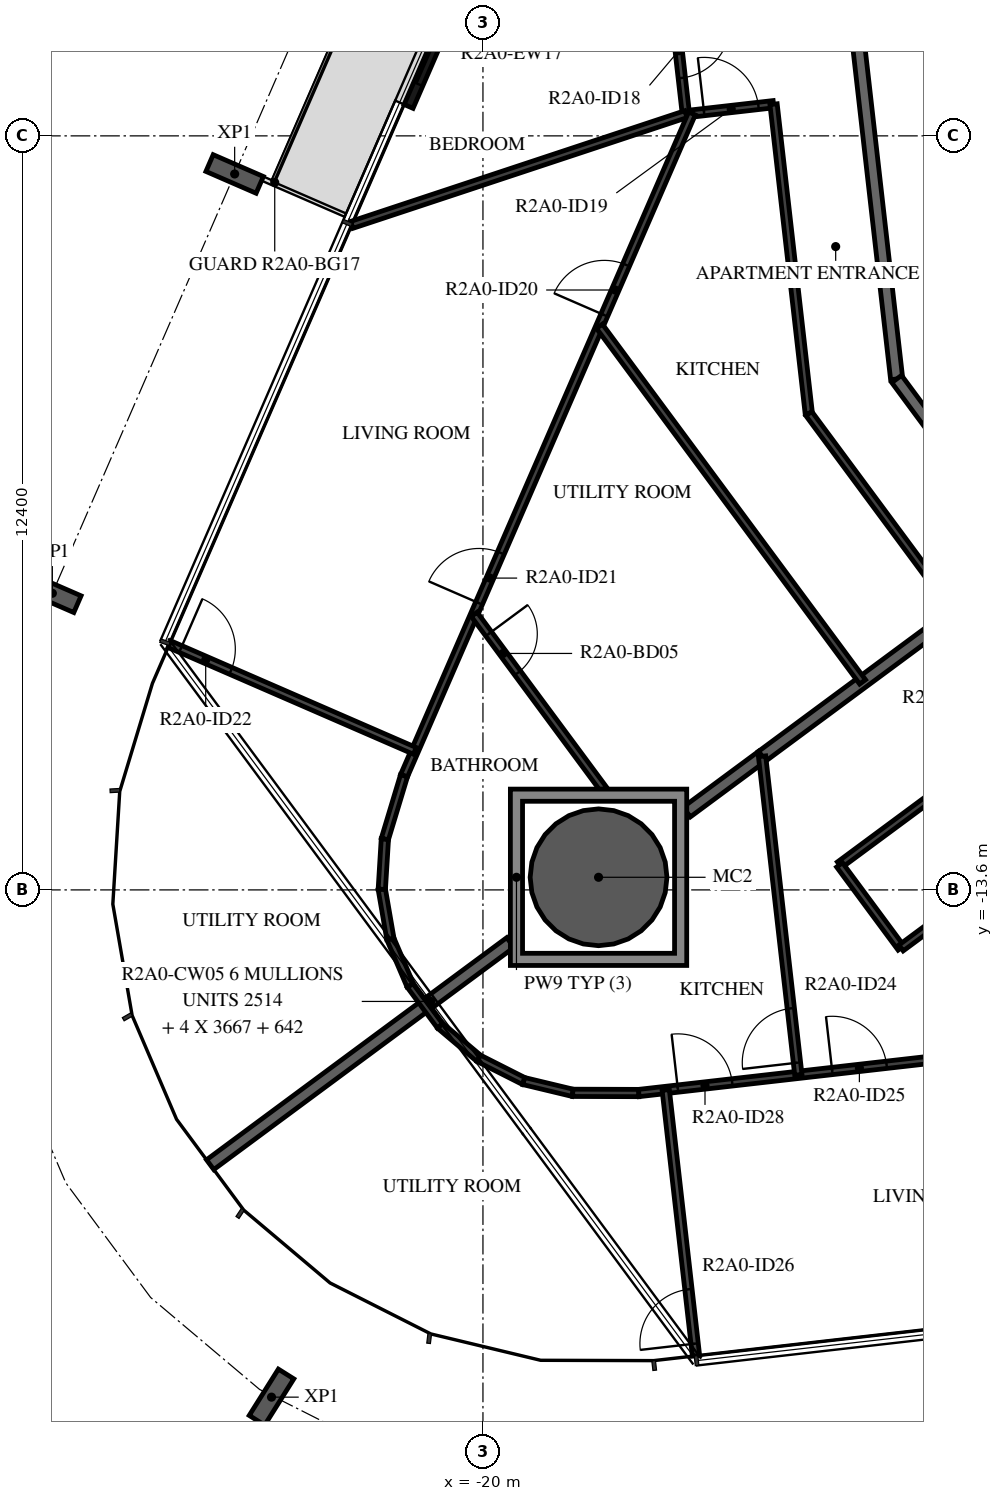
"""IFC4 building model, lengths in metres.
Left out: names, types, materials, properties, quantities, classifications, styles, units other than length and angle.
Written with IfcOpenShell. Run it as: python <this file> out.ifc"""

import sys

from ifc_helpers import new_model, si_unit, direction, frame, frame_2d, origin, origin_2d, place, context, subcontext, project, spatial, polyline, rectangle, hollow_circle, i_section, outline, extrude, element, fill, save


model = new_model("IFC4")
c1 = context("Model", 3, precision=1e-05, world=origin(), true_north=direction((0.0, 1.0)))
c2 = subcontext(c1, "Body", "Model", "MODEL_VIEW")
j1 = project(units=[si_unit("LENGTHUNIT", "METRE"), si_unit("PLANEANGLEUNIT", "RADIAN")], contexts=[c1])
p1 = place(None, origin())
s1 = spatial("IfcSite", under=j1, at=p1, CompositionType="ELEMENT")
p2 = place(p1, origin())
s2 = spatial("IfcBuilding", under=s1, at=p2, CompositionType="ELEMENT")
p3 = place(p2, frame((0.0, 0.0, 83.7)))
s3 = spatial("IfcBuildingStorey", under=s2, at=p3, CompositionType="ELEMENT", Elevation=83.7)
p4 = place(p3, frame((-18.099, -13.393, -0.38), z_axis=(0.0, 0.0, 1.0), x_axis=(1.0, 0.0, 0.0)))
e1 = element("IfcColumn", 1, at=p4, inside=s3, PredefinedType="COLUMN", context=c2, shape_type="SweptSolid", body=[
    extrude(hollow_circle(Radius=1.125, WallThickness=0.055, at=origin_2d()), origin(), (0.0, 0.0, 1.0), 3.5),
])
for number, where, z_axis, x_axis in (
    (2, (-24.083, -1.826, -0.38), (0.0, 0.0, 1.0), (0.399, 0.917, 0.0)),
    (3, (-27.081, -8.722, -0.38), (0.0, 0.0, 1.0), (0.399, 0.917, 0.0)),
    (4, (-23.477, -21.941, -0.38), (0.0, 0.0, 1.0), (-0.846, 0.532, 0.0)),
):
    element("IfcColumn", number, at=place(p3, frame(where, z_axis=z_axis, x_axis=x_axis)), inside=s3, PredefinedType="COLUMN", context=c2, shape_type="SweptSolid", body=[
        extrude(i_section(OverallWidth=0.3, OverallDepth=0.9, WebThickness=0.019, FlangeThickness=0.035, FilletRadius=0.03, at=origin_2d()), origin(), (0.0, 0.0, 1.0), 3.5),
    ])
p5 = place(p3, frame((-19.947, 2.219, 0.0), z_axis=(0.0, 0.0, 1.0), x_axis=(-0.398784695066, -0.917044582876, 0.0)))
e5 = element("IfcWall", 5, at=p5, inside=s3, PredefinedType="STANDARD", context=c2, shape_type="SweptSolid", body=[
    extrude(rectangle(XDim=3.2, YDim=0.16, at=frame_2d((1.6, 0.0))), origin(), (0.0, 0.0, 1.0), 3.12),
])
p6 = place(p5, frame((0.4, 0.0, 0.0)))
e6 = element("IfcOpeningElement", 6, at=p6, cuts=e5, PredefinedType="OPENING", context=c2, shape_type="SweptSolid", body=[
    extrude(rectangle(XDim=2.4, YDim=2.4, at=frame_2d((1.2, 1.2))), frame((0.0, 0.09, 0.0), z_axis=(0.0, -1.0, 0.0), x_axis=(1.0, 0.0, 0.0)), (0.0, 0.0, 1.0), 0.18),
])
p7 = place(p3, frame((-14.013, 1.974, 0.0), z_axis=(0.0, 0.0, 1.0), x_axis=(0.113196526349, -0.993572617589, 0.0)))
e7 = element("IfcWall", 7, at=p7, inside=s3, PredefinedType="STANDARD", context=c2, shape_type="SweptSolid", body=[
    extrude(rectangle(XDim=7.219, YDim=0.2, at=frame_2d((3.609, 0.0))), origin(), (0.0, 0.0, 1.0), 3.12),
])
p8 = place(p7, frame((0.2, 0.0, 0.0)))
e8 = element("IfcOpeningElement", 8, at=p8, cuts=e7, PredefinedType="OPENING", context=c2, shape_type="SweptSolid", body=[
    extrude(rectangle(XDim=1.0, YDim=2.1, at=frame_2d((0.5, 1.05))), frame((0.0, 0.11, 0.0), z_axis=(0.0, -1.0, 0.0), x_axis=(1.0, 0.0, 0.0)), (0.0, 0.0, 1.0), 0.22),
])
p9 = place(p3, frame((-13.196, -5.198, 0.0), z_axis=(0.0, 0.0, 1.0), x_axis=(0.594805187394, -0.803869883159, 0.0)))
e9 = element("IfcWall", 9, at=p9, inside=s3, PredefinedType="STANDARD", context=c2, shape_type="SweptSolid", body=[
    extrude(rectangle(XDim=7.342, YDim=0.2, at=frame_2d((3.671, 0.0))), origin(), (0.0, 0.0, 1.0), 3.12),
])
p10 = place(p3, frame((-15.41, -11.403, 0.0), z_axis=(0.0, 0.0, 1.0), x_axis=(0.803887568227, 0.594781285558, 0.0)))
e10 = element("IfcWall", 10, at=p10, inside=s3, PredefinedType="STANDARD", context=c2, shape_type="SweptSolid", body=[
    extrude(rectangle(XDim=5.47, YDim=0.2, at=frame_2d((2.735, 0.0))), origin(), (0.0, 0.0, 1.0), 3.12),
])
p11 = place(p3, frame((-16.649, -12.32, 0.0), z_axis=(0.0, 0.0, 1.0), x_axis=(0.803804030903, 0.594894175383, 0.0)))
e11 = element("IfcWall", 11, at=p11, inside=s3, PredefinedType="STANDARD", context=c2, shape_type="SweptSolid", body=[
    extrude(rectangle(XDim=1.542, YDim=0.2, at=frame_2d((0.771, 0.0))), origin(), (0.0, 0.0, 1.0), 3.12),
])
p12 = place(p3, frame((-24.486, -18.119, 0.0), z_axis=(0.0, 0.0, 1.0), x_axis=(0.80384227933, 0.594842491726, 0.0)))
e12 = element("IfcWall", 12, at=p12, inside=s3, PredefinedType="STANDARD", context=c2, shape_type="SweptSolid", body=[
    extrude(rectangle(XDim=6.142, YDim=0.2, at=frame_2d((3.071, 0.0))), origin(), (0.0, 0.0, 1.0), 3.12),
])
p13 = place(p3, frame((-16.854, 0.846, 0.0), z_axis=(0.0, 0.0, 1.0), x_axis=(0.113173930474, -0.993575191649, 0.0)))
e13 = element("IfcWall", 13, at=p13, inside=s3, PredefinedType="PARTITIONING", context=c2, shape_type="SweptSolid", body=[
    extrude(rectangle(XDim=1.7, YDim=0.12, at=frame_2d((0.85, 0.0))), origin(), (0.0, 0.0, 1.0), 3.12),
])
p14 = place(p13, frame((0.2, 0.0, 0.0)))
e14 = element("IfcOpeningElement", 14, at=p14, cuts=e13, PredefinedType="OPENING", context=c2, shape_type="SweptSolid", body=[
    extrude(rectangle(XDim=0.9, YDim=2.1, at=frame_2d((0.45, 1.05))), frame((0.0, 0.07, 0.0), z_axis=(0.0, -1.0, 0.0), x_axis=(1.0, 0.0, 0.0)), (0.0, 0.0, 1.0), 0.14),
])
p15 = place(p3, frame((-16.563, -0.832, 0.0), z_axis=(0.0, 0.0, 1.0), x_axis=(0.993578035261, 0.113148963084, 0.0)))
e15 = element("IfcWall", 15, at=p15, inside=s3, PredefinedType="PARTITIONING", context=c2, shape_type="SweptSolid", body=[
    extrude(rectangle(XDim=1.351, YDim=0.12, at=frame_2d((0.675, 0.0))), origin(), (0.0, 0.0, 1.0), 3.12),
])
p16 = place(p15, frame((0.2, 0.0, 0.0)))
e16 = element("IfcOpeningElement", 16, at=p16, cuts=e15, PredefinedType="OPENING", context=c2, shape_type="SweptSolid", body=[
    extrude(rectangle(XDim=0.9, YDim=2.1, at=frame_2d((0.45, 1.05))), frame((0.0, 0.07, 0.0), z_axis=(0.0, -1.0, 0.0), x_axis=(1.0, 0.0, 0.0)), (0.0, 0.0, 1.0), 0.14),
])
p17 = place(p3, frame((-15.221, -0.679, 0.0), z_axis=(0.0, 0.0, 1.0), x_axis=(0.113219875647, -0.993569957154, 0.0)))
e17 = element("IfcWall", 17, at=p17, inside=s3, PredefinedType="PARTITIONING", context=c2, shape_type="SweptSolid", body=[
    extrude(rectangle(XDim=5.121, YDim=0.12, at=frame_2d((2.561, 0.0))), origin(), (0.0, 0.0, 1.0), 3.12),
])
p18 = place(p3, frame((-14.641, -5.767, 0.0), z_axis=(0.0, 0.0, 1.0), x_axis=(0.594825885962, -0.803854567313, 0.0)))
e18 = element("IfcWall", 18, at=p18, inside=s3, PredefinedType="PARTITIONING", context=c2, shape_type="SweptSolid", body=[
    extrude(rectangle(XDim=6.266, YDim=0.12, at=frame_2d((3.133, 0.0))), origin(), (0.0, 0.0, 1.0), 3.12),
])
p19 = place(p18, frame((4.273, 0.0, 0.0)))
e19 = element("IfcOpeningElement", 19, at=p19, cuts=e18, PredefinedType="OPENING", context=c2, shape_type="SweptSolid", body=[
    extrude(rectangle(XDim=0.9, YDim=2.1, at=frame_2d((0.45, 1.05))), frame((0.0, 0.07, 0.0), z_axis=(0.0, -1.0, 0.0), x_axis=(1.0, 0.0, 0.0)), (0.0, 0.0, 1.0), 0.14),
])
p20 = place(p3, frame((-22.157, -2.664, 0.0), z_axis=(0.0, 0.0, 1.0), x_axis=(0.949263673698, 0.314481283698, 0.0)))
e20 = element("IfcWall", 20, at=p20, inside=s3, PredefinedType="PARTITIONING", context=c2, shape_type="SweptSolid", body=[
    extrude(rectangle(XDim=5.789, YDim=0.12, at=frame_2d((2.895, 0.0))), origin(), (0.0, 0.0, 1.0), 3.12),
])
p21 = place(p3, frame((-21.298, -11.722, 0.0), z_axis=(0.0, 0.0, 1.0), x_axis=(0.398737387658, 0.917065153456, 0.0)))
e21 = element("IfcWall", 21, at=p21, inside=s3, PredefinedType="PARTITIONING", context=c2, shape_type="SweptSolid", body=[
    extrude(rectangle(XDim=11.875, YDim=0.12, at=frame_2d((5.938, 0.0))), origin(), (0.0, 0.0, 1.0), 3.12),
])
p22 = place(p21, frame((8.26, 0.0, 0.0)))
e22 = element("IfcOpeningElement", 22, at=p22, cuts=e21, PredefinedType="OPENING", context=c2, shape_type="SweptSolid", body=[
    extrude(rectangle(XDim=0.9, YDim=2.1, at=frame_2d((0.45, 1.05))), frame((0.0, 0.07, 0.0), z_axis=(0.0, -1.0, 0.0), x_axis=(1.0, 0.0, 0.0)), (0.0, 0.0, 1.0), 0.14),
])
p23 = place(p21, frame((3.094, 0.0, 0.0)))
e23 = element("IfcOpeningElement", 23, at=p23, cuts=e21, PredefinedType="OPENING", context=c2, shape_type="SweptSolid", body=[
    extrude(rectangle(XDim=0.9, YDim=2.1, at=frame_2d((0.45, 1.05))), frame((0.0, 0.07, 0.0), z_axis=(0.0, -1.0, 0.0), x_axis=(1.0, 0.0, 0.0)), (0.0, 0.0, 1.0), 0.14),
])
p24 = place(p3, frame((-25.156, -9.559, 0.0), z_axis=(0.0, 0.0, 1.0), x_axis=(0.917042707292, -0.398789008127, 0.0)))
e24 = element("IfcWall", 24, at=p24, inside=s3, PredefinedType="PARTITIONING", context=c2, shape_type="SweptSolid", body=[
    extrude(rectangle(XDim=4.4, YDim=0.12, at=frame_2d((2.2, 0.0))), origin(), (0.0, 0.0, 1.0), 2.73),
])
p25 = place(p24, frame((0.2, 0.0, 0.0)))
e25 = element("IfcOpeningElement", 25, at=p25, cuts=e24, PredefinedType="OPENING", context=c2, shape_type="SweptSolid", body=[
    extrude(rectangle(XDim=0.9, YDim=2.1, at=frame_2d((0.45, 1.05))), frame((0.0, 0.07, 0.0), z_axis=(0.0, -1.0, 0.0), x_axis=(1.0, 0.0, 0.0)), (0.0, 0.0, 1.0), 0.14),
])
p26 = place(p3, frame((-18.084, -4.331, 0.0), z_axis=(0.0, 0.0, 1.0), x_axis=(0.594811782108, -0.803865003508, 0.0)))
e26 = element("IfcWall", 26, at=p26, inside=s3, PredefinedType="PARTITIONING", context=c2, shape_type="SweptSolid", body=[
    extrude(rectangle(XDim=7.276, YDim=0.12, at=frame_2d((3.638, 0.0))), origin(), (0.0, 0.0, 1.0), 3.12),
])
p27 = place(p3, frame((-20.144, -9.068, 0.0), z_axis=(0.0, 0.0, 1.0), x_axis=(0.59487477233, -0.803818390711, 0.0)))
e27 = element("IfcWall", 27, at=p27, inside=s3, PredefinedType="PARTITIONING", context=c2, shape_type="SweptSolid", body=[
    extrude(rectangle(XDim=3.575, YDim=0.12, at=frame_2d((1.788, 0.0))), origin(), (0.0, 0.0, 1.0), 3.12),
])
p28 = place(p27, frame((0.4, 0.0, 0.0)))
e28 = element("IfcOpeningElement", 28, at=p28, cuts=e27, PredefinedType="OPENING", context=c2, shape_type="SweptSolid", body=[
    extrude(rectangle(XDim=0.8, YDim=2.1, at=frame_2d((0.4, 1.05))), frame((0.0, 0.07, 0.0), z_axis=(0.0, -1.0, 0.0), x_axis=(1.0, 0.0, 0.0)), (0.0, 0.0, 1.0), 0.14),
])
for number, where, z_axis, x_axis in (
    (29, (-20.703, -15.835, 0.0), (0.0, 0.0, 1.0), (-0.595, 0.804, 0.0)),
    (30, (-21.196, -15.168, 0.0), (0.0, 0.0, 1.0), (-0.394, 0.919, 0.0)),
):
    element("IfcWall", number, at=place(p3, frame(where, z_axis=z_axis, x_axis=x_axis)), inside=s3, PredefinedType="PARTITIONING", context=c2, shape_type="SweptSolid", body=[
        extrude(rectangle(XDim=0.829, YDim=0.12, at=frame_2d((0.415, 0.0))), origin(), (0.0, 0.0, 1.0), 3.12),
    ])
p29 = place(p3, frame((-21.522, -14.406, 0.0), z_axis=(0.0, 0.0, 1.0), x_axis=(-0.170794347099, 0.985306698952, 0.0)))
e31 = element("IfcWall", 31, at=p29, inside=s3, PredefinedType="PARTITIONING", context=c2, shape_type="SweptSolid", body=[
    extrude(rectangle(XDim=0.829, YDim=0.12, at=frame_2d((0.415, 0.0))), origin(), (0.0, 0.0, 1.0), 3.12),
])
p30 = place(p3, frame((-21.664, -13.59, 0.0), z_axis=(0.0, 0.0, 1.0), x_axis=(0.061277779288, 0.998120751095, 0.0)))
e32 = element("IfcWall", 32, at=p30, inside=s3, PredefinedType="PARTITIONING", context=c2, shape_type="SweptSolid", body=[
    extrude(rectangle(XDim=0.829, YDim=0.12, at=frame_2d((0.414, 0.0))), origin(), (0.0, 0.0, 1.0), 3.12),
])
p31 = place(p3, frame((-21.613, -12.762, 0.0), z_axis=(0.0, 0.0, 1.0), x_axis=(0.289552239308, 0.95716221233, 0.0)))
e33 = element("IfcWall", 33, at=p31, inside=s3, PredefinedType="PARTITIONING", context=c2, shape_type="SweptSolid", body=[
    extrude(rectangle(XDim=1.087, YDim=0.12, at=frame_2d((0.543, 0.0))), origin(), (0.0, 0.0, 1.0), 3.12),
])
p32 = place(p3, frame((-10.914, -10.804, 0.0), z_axis=(0.0, 0.0, 1.0), x_axis=(-0.803864616889, -0.594812304609, 0.0)))
e34 = element("IfcWall", 34, at=p32, inside=s3, PredefinedType="PARTITIONING", context=c2, shape_type="SweptSolid", body=[
    extrude(rectangle(XDim=4.008, YDim=0.12, at=frame_2d((2.004, 0.0))), origin(), (0.0, 0.0, 1.0), 3.12),
])
p33 = place(p3, frame((-14.136, -13.188, 0.0), z_axis=(0.0, 0.0, 1.0), x_axis=(0.594863421241, -0.803826791087, 0.0)))
e35 = element("IfcWall", 35, at=p33, inside=s3, PredefinedType="PARTITIONING", context=c2, shape_type="SweptSolid", body=[
    extrude(rectangle(XDim=1.7, YDim=0.12, at=frame_2d((0.85, 0.0))), origin(), (0.0, 0.0, 1.0), 3.12),
])
p34 = place(p3, frame((-13.125, -14.555, 0.0), z_axis=(0.0, 0.0, 1.0), x_axis=(0.80389374229, 0.594772940799, 0.0)))
e36 = element("IfcWall", 36, at=p34, inside=s3, PredefinedType="PARTITIONING", context=c2, shape_type="SweptSolid", body=[
    extrude(rectangle(XDim=4.008, YDim=0.12, at=frame_2d((2.004, 0.0))), origin(), (0.0, 0.0, 1.0), 3.12),
])
for number, where, z_axis, x_axis in (
    (37, (-20.703, -15.835, 0.0), (0.0, 0.0, 1.0), (0.764, -0.645, 0.0)),
    (38, (-20.069, -16.369, 0.0), (0.0, 0.0, 1.0), (0.892, -0.451, 0.0)),
):
    element("IfcWall", number, at=place(p3, frame(where, z_axis=z_axis, x_axis=x_axis)), inside=s3, PredefinedType="PARTITIONING", context=c2, shape_type="SweptSolid", body=[
        extrude(rectangle(XDim=0.829, YDim=0.12, at=frame_2d((0.415, 0.0))), origin(), (0.0, 0.0, 1.0), 3.12),
    ])
p35 = place(p3, frame((-19.33, -16.744, 0.0), z_axis=(0.0, 0.0, 1.0), x_axis=(0.972403343288, -0.23330610357, 0.0)))
e39 = element("IfcWall", 39, at=p35, inside=s3, PredefinedType="PARTITIONING", context=c2, shape_type="SweptSolid", body=[
    extrude(rectangle(XDim=0.829, YDim=0.12, at=frame_2d((0.415, 0.0))), origin(), (0.0, 0.0, 1.0), 3.12),
])
p36 = place(p3, frame((-18.524, -16.937, 0.0), z_axis=(0.0, 0.0, 1.0), x_axis=(0.999995736722, -0.00292002349, 0.0)))
e40 = element("IfcWall", 40, at=p36, inside=s3, PredefinedType="PARTITIONING", context=c2, shape_type="SweptSolid", body=[
    extrude(rectangle(XDim=1.087, YDim=0.12, at=frame_2d((0.543, 0.0))), origin(), (0.0, 0.0, 1.0), 3.12),
])
p37 = place(p3, frame((-17.437, -16.94, 0.0), z_axis=(0.0, 0.0, 1.0), x_axis=(0.993573314119, 0.113190412448, 0.0)))
e41 = element("IfcWall", 41, at=p37, inside=s3, PredefinedType="PARTITIONING", context=c2, shape_type="SweptSolid", body=[
    extrude(rectangle(XDim=14.576, YDim=0.12, at=frame_2d((7.288, 0.0))), origin(), (0.0, 0.0, 1.0), 3.12),
])
p38 = place(p37, frame((3.201, 0.0, 0.0)))
e42 = element("IfcOpeningElement", 42, at=p38, cuts=e41, PredefinedType="OPENING", context=c2, shape_type="SweptSolid", body=[
    extrude(rectangle(XDim=0.9, YDim=2.1, at=frame_2d((0.45, 1.05))), frame((0.0, 0.07, 0.0), z_axis=(0.0, -1.0, 0.0), x_axis=(1.0, 0.0, 0.0)), (0.0, 0.0, 1.0), 0.14),
])
p39 = place(p37, frame((0.645, 0.0, 0.0)))
e43 = element("IfcOpeningElement", 43, at=p39, cuts=e41, PredefinedType="OPENING", context=c2, shape_type="SweptSolid", body=[
    extrude(rectangle(XDim=0.9, YDim=2.1, at=frame_2d((0.45, 1.05))), frame((0.0, 0.07, 0.0), z_axis=(0.0, -1.0, 0.0), x_axis=(1.0, 0.0, 0.0)), (0.0, 0.0, 1.0), 0.14),
])
p40 = place(p3, frame((-14.813, -16.641, 0.0), z_axis=(0.0, 0.0, 1.0), x_axis=(-0.113210971478, 0.993570971767, 0.0)))
e44 = element("IfcWall", 44, at=p40, inside=s3, PredefinedType="PARTITIONING", context=c2, shape_type="SweptSolid", body=[
    extrude(rectangle(XDim=5.273, YDim=0.12, at=frame_2d((2.636, 0.0))), origin(), (0.0, 0.0, 1.0), 3.12),
])
p41 = place(p40, frame((0.2, 0.0, 0.0)))
e45 = element("IfcOpeningElement", 45, at=p41, cuts=e44, PredefinedType="OPENING", context=c2, shape_type="SweptSolid", body=[
    extrude(rectangle(XDim=0.9, YDim=2.1, at=frame_2d((0.45, 1.05))), frame((0.0, 0.07, 0.0), z_axis=(0.0, -1.0, 0.0), x_axis=(1.0, 0.0, 0.0)), (0.0, 0.0, 1.0), 0.14),
])
p42 = place(p3, frame((-16.496, -21.262, 0.0), z_axis=(0.0, 0.0, 1.0), x_axis=(-0.1132445713, 0.993567142709, 0.0)))
e46 = element("IfcWall", 46, at=p42, inside=s3, PredefinedType="PARTITIONING", context=c2, shape_type="SweptSolid", body=[
    extrude(rectangle(XDim=4.4, YDim=0.12, at=frame_2d((2.2, 0.0))), origin(), (0.0, 0.0, 1.0), 2.73),
])
p43 = place(p42, frame((0.2, 0.0, 0.0)))
e47 = element("IfcOpeningElement", 47, at=p43, cuts=e46, PredefinedType="OPENING", context=c2, shape_type="SweptSolid", body=[
    extrude(rectangle(XDim=0.9, YDim=2.1, at=frame_2d((0.45, 1.05))), frame((0.0, 0.07, 0.0), z_axis=(0.0, -1.0, 0.0), x_axis=(1.0, 0.0, 0.0)), (0.0, 0.0, 1.0), 0.14),
])
p44 = place(p3, origin())
e48 = element("IfcWall", 48, at=p44, inside=s3, PredefinedType="STANDARD", context=c2, shape_type="SweptSolid", body=[
    extrude(outline(polyline([(-16.649, -11.942), (-16.649, -14.843), (-19.549, -14.843), (-19.549, -11.942), (-16.649, -11.942)]), holes=[polyline([(-19.349, -14.643), (-16.849, -14.643), (-16.849, -12.143), (-19.349, -12.143), (-19.349, -14.643)])]), origin(), (0.0, 0.0, 1.0), 3.12),
])
p45 = place(p6, origin())
e49 = element("IfcDoor", 49, at=p45, inside=s3, OperationType="DOUBLE_DOOR_SLIDING", PredefinedType="DOOR", context=c2, shape_type="SweptSolid", body=[
    extrude(rectangle(XDim=2.4, YDim=2.4, at=frame_2d((1.2, 1.2))), frame((0.0, 0.025, 0.0), z_axis=(0.0, -1.0, 0.0), x_axis=(1.0, 0.0, 0.0)), (0.0, 0.0, 1.0), 0.05),
])
fill(e6, e49)
p46 = place(p14, origin())
e50 = element("IfcDoor", 50, at=p46, inside=s3, OperationType="SINGLE_SWING_RIGHT", PredefinedType="DOOR", context=c2, shape_type="SweptSolid", body=[
    extrude(rectangle(XDim=0.9, YDim=2.1, at=frame_2d((0.45, 1.05))), frame((0.0, 0.025, 0.0), z_axis=(0.0, -1.0, 0.0), x_axis=(1.0, 0.0, 0.0)), (0.0, 0.0, 1.0), 0.05),
])
fill(e14, e50)
p47 = place(p16, origin())
e51 = element("IfcDoor", 51, at=p47, inside=s3, OperationType="SINGLE_SWING_LEFT", PredefinedType="DOOR", context=c2, shape_type="SweptSolid", body=[
    extrude(rectangle(XDim=0.9, YDim=2.1, at=frame_2d((0.45, 1.05))), frame((0.0, 0.025, 0.0), z_axis=(0.0, -1.0, 0.0), x_axis=(1.0, 0.0, 0.0)), (0.0, 0.0, 1.0), 0.05),
])
fill(e16, e51)
p48 = place(p22, origin())
e52 = element("IfcDoor", 52, at=p48, inside=s3, OperationType="SINGLE_SWING_RIGHT", PredefinedType="DOOR", context=c2, shape_type="SweptSolid", body=[
    extrude(rectangle(XDim=0.9, YDim=2.1, at=frame_2d((0.45, 1.05))), frame((0.0, 0.025, 0.0), z_axis=(0.0, -1.0, 0.0), x_axis=(1.0, 0.0, 0.0)), (0.0, 0.0, 1.0), 0.05),
])
fill(e22, e52)
p49 = place(p23, origin())
e53 = element("IfcDoor", 53, at=p49, inside=s3, OperationType="SINGLE_SWING_LEFT", PredefinedType="DOOR", context=c2, shape_type="SweptSolid", body=[
    extrude(rectangle(XDim=0.9, YDim=2.1, at=frame_2d((0.45, 1.05))), frame((0.0, 0.025, 0.0), z_axis=(0.0, -1.0, 0.0), x_axis=(1.0, 0.0, 0.0)), (0.0, 0.0, 1.0), 0.05),
])
fill(e23, e53)
p50 = place(p28, origin())
e54 = element("IfcDoor", 54, at=p50, inside=s3, OperationType="SINGLE_SWING_RIGHT", PredefinedType="DOOR", context=c2, shape_type="SweptSolid", body=[
    extrude(rectangle(XDim=0.8, YDim=2.1, at=frame_2d((0.4, 1.05))), frame((0.0, 0.025, 0.0), z_axis=(0.0, -1.0, 0.0), x_axis=(1.0, 0.0, 0.0)), (0.0, 0.0, 1.0), 0.05),
])
fill(e28, e54)
p51 = place(p25, origin())
e55 = element("IfcDoor", 55, at=p51, inside=s3, OperationType="SINGLE_SWING_RIGHT", PredefinedType="DOOR", context=c2, shape_type="SweptSolid", body=[
    extrude(rectangle(XDim=0.9, YDim=2.1, at=frame_2d((0.45, 1.05))), frame((0.0, 0.025, 0.0), z_axis=(0.0, -1.0, 0.0), x_axis=(1.0, 0.0, 0.0)), (0.0, 0.0, 1.0), 0.05),
])
fill(e25, e55)
p52 = place(p41, origin())
e56 = element("IfcDoor", 56, at=p52, inside=s3, OperationType="SINGLE_SWING_LEFT", PredefinedType="DOOR", context=c2, shape_type="SweptSolid", body=[
    extrude(rectangle(XDim=0.9, YDim=2.1, at=frame_2d((0.45, 1.05))), frame((0.0, 0.025, 0.0), z_axis=(0.0, -1.0, 0.0), x_axis=(1.0, 0.0, 0.0)), (0.0, 0.0, 1.0), 0.05),
])
fill(e45, e56)
p53 = place(p38, origin())
e57 = element("IfcDoor", 57, at=p53, inside=s3, OperationType="SINGLE_SWING_LEFT", PredefinedType="DOOR", context=c2, shape_type="SweptSolid", body=[
    extrude(rectangle(XDim=0.9, YDim=2.1, at=frame_2d((0.45, 1.05))), frame((0.0, 0.025, 0.0), z_axis=(0.0, -1.0, 0.0), x_axis=(1.0, 0.0, 0.0)), (0.0, 0.0, 1.0), 0.05),
])
fill(e42, e57)
p54 = place(p43, origin())
e58 = element("IfcDoor", 58, at=p54, inside=s3, OperationType="SINGLE_SWING_LEFT", PredefinedType="DOOR", context=c2, shape_type="SweptSolid", body=[
    extrude(rectangle(XDim=0.9, YDim=2.1, at=frame_2d((0.45, 1.05))), frame((0.0, 0.025, 0.0), z_axis=(0.0, -1.0, 0.0), x_axis=(1.0, 0.0, 0.0)), (0.0, 0.0, 1.0), 0.05),
])
fill(e47, e58)
p55 = place(p39, origin())
e59 = element("IfcDoor", 59, at=p55, inside=s3, OperationType="SINGLE_SWING_RIGHT", PredefinedType="DOOR", context=c2, shape_type="SweptSolid", body=[
    extrude(rectangle(XDim=0.9, YDim=2.1, at=frame_2d((0.45, 1.05))), frame((0.0, 0.025, 0.0), z_axis=(0.0, -1.0, 0.0), x_axis=(1.0, 0.0, 0.0)), (0.0, 0.0, 1.0), 0.05),
])
fill(e43, e59)
save(model, sys.argv[1])
